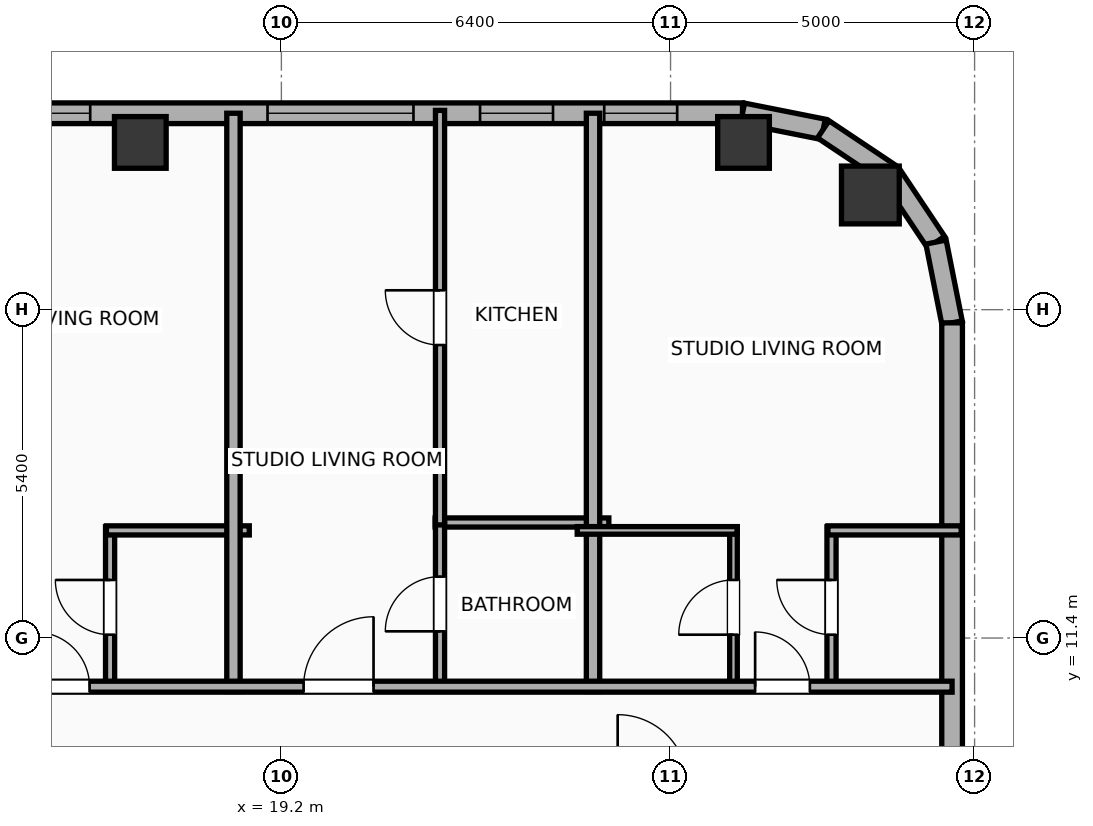
"""IFC4 building model, lengths in metres.
Left out: names, types, materials, properties, quantities, classifications, styles, units other than length and angle.
Written with IfcOpenShell. Run it as: python <this file> out.ifc"""

import sys

from ifc_helpers import new_model, si_unit, direction, frame, frame_2d, origin, origin_2d, place, context, subcontext, project, spatial, rectangle, hollow_rectangle, hollow_circle, extrude, element, fill, save


model = new_model("IFC4")
c1 = context("Model", 3, precision=1e-05, world=origin(), true_north=direction((0.0, 1.0)))
c2 = subcontext(c1, "Body", "Model", "MODEL_VIEW")
j1 = project(units=[si_unit("LENGTHUNIT", "METRE"), si_unit("PLANEANGLEUNIT", "RADIAN")], contexts=[c1])
p1 = place(None, origin())
s1 = spatial("IfcSite", under=j1, at=p1, CompositionType="ELEMENT")
p2 = place(p1, origin())
s2 = spatial("IfcBuilding", under=s1, at=p2, CompositionType="ELEMENT")
p3 = place(p2, frame((0.0, 0.0, 247.0)))
s3 = spatial("IfcBuildingStorey", under=s2, at=p3, CompositionType="ELEMENT", Elevation=247.0)
p4 = place(p3, frame((28.886, 18.686, 0.0), z_axis=(0.0, 0.0, 1.0), x_axis=(1.0, 0.0, 0.0)))
e1 = element("IfcColumn", 1, at=p4, inside=s3, PredefinedType="COLUMN", context=c2, shape_type="SweptSolid", body=[
    extrude(hollow_circle(Radius=0.475, WallThickness=0.032, at=origin_2d()), origin(), (0.0, 0.0, 1.0), 3.9),
])
for number, where, z_axis, x_axis in (
    (2, (26.8, 19.55, 0.0), (0.0, 0.0, 1.0), (1.0, 0.0, 0.0)),
    (3, (16.88, 19.55, 0.0), (0.0, 0.0, 1.0), (1.0, 0.0, 0.0)),
):
    element("IfcColumn", number, at=place(p3, frame(where, z_axis=z_axis, x_axis=x_axis)), inside=s3, PredefinedType="COLUMN", context=c2, shape_type="SweptSolid", body=[
        extrude(hollow_rectangle(XDim=0.85, YDim=0.85, WallThickness=0.028, at=origin_2d()), origin(), (0.0, 0.0, 1.0), 3.9),
    ])
p5 = place(p3, frame((-22.783, 20.03, 0.0), z_axis=(0.0, 0.0, 1.0), x_axis=(1.0, 0.0, 0.0)))
e4 = element("IfcWall", 4, at=p5, inside=s3, PredefinedType="ELEMENTEDWALL", context=c2, shape_type="SweptSolid", body=[
    extrude(rectangle(XDim=49.566, YDim=0.34, at=frame_2d((24.783, 0.0))), origin(), (0.0, 0.0, 1.0), 3.65),
])
p6 = place(p5, frame((6.211, 0.0, 0.75)))
e5 = element("IfcOpeningElement", 5, at=p6, cuts=e4, PredefinedType="OPENING", context=c2, shape_type="SweptSolid", body=[
    extrude(rectangle(XDim=2.4, YDim=2.1, at=frame_2d((1.2, 1.05))), frame((0.0, 0.18, 0.0), z_axis=(0.0, -1.0, 0.0), x_axis=(1.0, 0.0, 0.0)), (0.0, 0.0, 1.0), 0.36),
])
p7 = place(p5, frame((23.583, 0.0, 0.75)))
e6 = element("IfcOpeningElement", 6, at=p7, cuts=e4, PredefinedType="OPENING", context=c2, shape_type="SweptSolid", body=[
    extrude(rectangle(XDim=2.4, YDim=2.1, at=frame_2d((1.2, 1.05))), frame((0.0, 0.18, 0.0), z_axis=(0.0, -1.0, 0.0), x_axis=(1.0, 0.0, 0.0)), (0.0, 0.0, 1.0), 0.36),
])
p8 = place(p5, frame((41.756, 0.0, 0.75)))
e7 = element("IfcOpeningElement", 7, at=p8, cuts=e4, PredefinedType="OPENING", context=c2, shape_type="SweptSolid", body=[
    extrude(rectangle(XDim=2.4, YDim=2.1, at=frame_2d((1.2, 1.05))), frame((0.0, 0.18, 0.0), z_axis=(0.0, -1.0, 0.0), x_axis=(1.0, 0.0, 0.0)), (0.0, 0.0, 1.0), 0.36),
])
p9 = place(p5, frame((3.511, 0.0, 0.75)))
e8 = element("IfcOpeningElement", 8, at=p9, cuts=e4, PredefinedType="OPENING", context=c2, shape_type="SweptSolid", body=[
    extrude(rectangle(XDim=1.2, YDim=2.05, at=frame_2d((0.6, 1.025))), frame((0.0, 0.18, 0.0), z_axis=(0.0, -1.0, 0.0), x_axis=(1.0, 0.0, 0.0)), (0.0, 0.0, 1.0), 0.36),
])
p10 = place(p5, frame((11.933, 0.0, 0.75)))
e9 = element("IfcOpeningElement", 9, at=p10, cuts=e4, PredefinedType="OPENING", context=c2, shape_type="SweptSolid", body=[
    extrude(rectangle(XDim=1.2, YDim=2.05, at=frame_2d((0.6, 1.025))), frame((0.0, 0.18, 0.0), z_axis=(0.0, -1.0, 0.0), x_axis=(1.0, 0.0, 0.0)), (0.0, 0.0, 1.0), 0.36),
])
p11 = place(p5, frame((17.953, 0.0, 0.75)))
e10 = element("IfcOpeningElement", 10, at=p11, cuts=e4, PredefinedType="OPENING", context=c2, shape_type="SweptSolid", body=[
    extrude(rectangle(XDim=1.2, YDim=2.05, at=frame_2d((0.6, 1.025))), frame((0.0, 0.18, 0.0), z_axis=(0.0, -1.0, 0.0), x_axis=(1.0, 0.0, 0.0)), (0.0, 0.0, 1.0), 0.36),
])
p12 = place(p5, frame((27.018, 0.0, 0.75)))
e11 = element("IfcOpeningElement", 11, at=p12, cuts=e4, PredefinedType="OPENING", context=c2, shape_type="SweptSolid", body=[
    extrude(rectangle(XDim=1.2, YDim=2.05, at=frame_2d((0.6, 1.025))), frame((0.0, 0.18, 0.0), z_axis=(0.0, -1.0, 0.0), x_axis=(1.0, 0.0, 0.0)), (0.0, 0.0, 1.0), 0.36),
])
p13 = place(p5, frame((30.368, 0.0, 0.75)))
e12 = element("IfcOpeningElement", 12, at=p13, cuts=e4, PredefinedType="OPENING", context=c2, shape_type="SweptSolid", body=[
    extrude(rectangle(XDim=1.2, YDim=2.05, at=frame_2d((0.6, 1.025))), frame((0.0, 0.18, 0.0), z_axis=(0.0, -1.0, 0.0), x_axis=(1.0, 0.0, 0.0)), (0.0, 0.0, 1.0), 0.36),
])
p14 = place(p5, frame((33.378, 0.0, 0.75)))
e13 = element("IfcOpeningElement", 13, at=p14, cuts=e4, PredefinedType="OPENING", context=c2, shape_type="SweptSolid", body=[
    extrude(rectangle(XDim=1.2, YDim=2.05, at=frame_2d((0.6, 1.025))), frame((0.0, 0.18, 0.0), z_axis=(0.0, -1.0, 0.0), x_axis=(1.0, 0.0, 0.0)), (0.0, 0.0, 1.0), 0.36),
])
p15 = place(p5, frame((37.639, 0.0, 0.75)))
e14 = element("IfcOpeningElement", 14, at=p15, cuts=e4, PredefinedType="OPENING", context=c2, shape_type="SweptSolid", body=[
    extrude(rectangle(XDim=1.2, YDim=2.05, at=frame_2d((0.6, 1.025))), frame((0.0, 0.18, 0.0), z_axis=(0.0, -1.0, 0.0), x_axis=(1.0, 0.0, 0.0)), (0.0, 0.0, 1.0), 0.36),
])
p16 = place(p5, frame((45.25, 0.0, 0.75)))
e15 = element("IfcOpeningElement", 15, at=p16, cuts=e4, PredefinedType="OPENING", context=c2, shape_type="SweptSolid", body=[
    extrude(rectangle(XDim=1.2, YDim=2.05, at=frame_2d((0.6, 1.025))), frame((0.0, 0.18, 0.0), z_axis=(0.0, -1.0, 0.0), x_axis=(1.0, 0.0, 0.0)), (0.0, 0.0, 1.0), 0.36),
])
p17 = place(p5, frame((47.292, 0.0, 0.75)))
e16 = element("IfcOpeningElement", 16, at=p17, cuts=e4, PredefinedType="OPENING", context=c2, shape_type="SweptSolid", body=[
    extrude(rectangle(XDim=1.2, YDim=2.05, at=frame_2d((0.6, 1.025))), frame((0.0, 0.18, 0.0), z_axis=(0.0, -1.0, 0.0), x_axis=(1.0, 0.0, 0.0)), (0.0, 0.0, 1.0), 0.36),
])
p18 = place(p3, frame((26.783, 20.03, 0.0), z_axis=(0.0, 0.0, 1.0), x_axis=(0.980788153188, -0.195075878998, 0.0)))
e17 = element("IfcWall", 17, at=p18, inside=s3, PredefinedType="ELEMENTEDWALL", context=c2, shape_type="SweptSolid", body=[
    extrude(rectangle(XDim=1.354, YDim=0.34, at=frame_2d((0.677, 0.0))), origin(), (0.0, 0.0, 1.0), 3.65),
])
for number, where, z_axis, x_axis in (
    (18, (28.111, 19.766, 0.0), (0.0, 0.0, 1.0), (0.831, -0.556, 0.0)),
    (19, (29.223, 19.023, 0.0), (0.0, 0.0, 1.0), (0.556, -0.831, 0.0)),
):
    element("IfcWall", number, at=place(p3, frame(where, z_axis=z_axis, x_axis=x_axis)), inside=s3, PredefinedType="ELEMENTEDWALL", context=c2, shape_type="SweptSolid", body=[
        extrude(rectangle(XDim=1.337, YDim=0.34, at=frame_2d((0.668, 0.0))), origin(), (0.0, 0.0, 1.0), 3.65),
    ])
p19 = place(p3, frame((29.966, 17.911, 0.0), z_axis=(0.0, 0.0, 1.0), x_axis=(0.195075878998, -0.980788153188, 0.0)))
e20 = element("IfcWall", 20, at=p19, inside=s3, PredefinedType="ELEMENTEDWALL", context=c2, shape_type="SweptSolid", body=[
    extrude(rectangle(XDim=1.354, YDim=0.34, at=frame_2d((0.677, 0.0))), origin(), (0.0, 0.0, 1.0), 3.65),
])
p20 = place(p3, frame((30.23, 16.583, 0.0), z_axis=(0.0, 0.0, 1.0), x_axis=(0.0, -1.0, 0.0)))
e21 = element("IfcWall", 21, at=p20, inside=s3, PredefinedType="ELEMENTEDWALL", context=c2, shape_type="SweptSolid", body=[
    extrude(rectangle(XDim=31.967, YDim=0.34, at=frame_2d((15.983, 0.0))), origin(), (0.0, 0.0, 1.0), 3.65),
])
p21 = place(p20, frame((11.388, 0.0, 0.75)))
e22 = element("IfcOpeningElement", 22, at=p21, cuts=e21, PredefinedType="OPENING", context=c2, shape_type="SweptSolid", body=[
    extrude(rectangle(XDim=1.2, YDim=2.05, at=frame_2d((0.6, 1.025))), frame((0.0, 0.18, 0.0), z_axis=(0.0, -1.0, 0.0), x_axis=(1.0, 0.0, 0.0)), (0.0, 0.0, 1.0), 0.36),
])
p22 = place(p20, frame((20.438, 0.0, 0.75)))
e23 = element("IfcOpeningElement", 23, at=p22, cuts=e21, PredefinedType="OPENING", context=c2, shape_type="SweptSolid", body=[
    extrude(rectangle(XDim=1.2, YDim=2.05, at=frame_2d((0.6, 1.025))), frame((0.0, 0.18, 0.0), z_axis=(0.0, -1.0, 0.0), x_axis=(1.0, 0.0, 0.0)), (0.0, 0.0, 1.0), 0.36),
])
p23 = place(p3, frame((16.383, 10.58, 0.0), z_axis=(0.0, 0.0, 1.0), x_axis=(0.0, 1.0, 0.0)))
e24 = element("IfcWall", 24, at=p23, inside=s3, PredefinedType="PLUMBINGWALL", context=c2, shape_type="SweptSolid", body=[
    extrude(rectangle(XDim=2.65, YDim=0.15, at=frame_2d((1.325, 0.0))), origin(), (0.0, 0.0, 1.0), 3.09),
])
p24 = place(p23, frame((0.875, 0.0, 0.0)))
e25 = element("IfcOpeningElement", 25, at=p24, cuts=e24, PredefinedType="OPENING", context=c2, shape_type="SweptSolid", body=[
    extrude(rectangle(XDim=0.9, YDim=2.05, at=frame_2d((0.45, 1.025))), frame((0.0, 0.085, 0.0), z_axis=(0.0, -1.0, 0.0), x_axis=(1.0, 0.0, 0.0)), (0.0, 0.0, 1.0), 0.17),
])
p25 = place(p3, frame((16.323, 13.17, 0.0), z_axis=(0.0, 0.0, 1.0), x_axis=(1.0, 0.0, 0.0)))
e26 = element("IfcWall", 26, at=p25, inside=s3, PredefinedType="PLUMBINGWALL", context=c2, shape_type="SweptSolid", body=[
    extrude(rectangle(XDim=2.349, YDim=0.15, at=frame_2d((1.175, 0.0))), origin(), (0.0, 0.0, 1.0), 3.65),
])
p26 = place(p3, frame((18.412, 10.52, 0.0), z_axis=(0.0, 0.0, 1.0), x_axis=(0.0, 1.0, 0.0)))
e27 = element("IfcWall", 27, at=p26, inside=s3, PredefinedType="PARTITIONING", context=c2, shape_type="SweptSolid", body=[
    extrude(rectangle(XDim=9.51, YDim=0.22, at=frame_2d((4.755, 0.0))), origin(), (0.0, 0.0, 1.0), 3.65),
])
p27 = place(p3, frame((21.729, 13.3, 0.0), z_axis=(0.0, 0.0, 1.0), x_axis=(1.0, 0.0, 0.0)))
e28 = element("IfcWall", 28, at=p27, inside=s3, PredefinedType="PLUMBINGWALL", context=c2, shape_type="SweptSolid", body=[
    extrude(rectangle(XDim=2.856, YDim=0.15, at=frame_2d((1.428, 0.0))), origin(), (0.0, 0.0, 1.0), 3.65),
])
p28 = place(p3, frame((21.809, 10.58, 0.0), z_axis=(0.0, 0.0, 1.0), x_axis=(0.0, 1.0, 0.0)))
e29 = element("IfcWall", 29, at=p28, inside=s3, PredefinedType="PLUMBINGWALL", context=c2, shape_type="SweptSolid", body=[
    extrude(rectangle(XDim=2.76, YDim=0.15, at=frame_2d((1.38, 0.0))), origin(), (0.0, 0.0, 1.0), 3.65),
])
p29 = place(p28, frame((0.93, 0.0, 0.0)))
e30 = element("IfcOpeningElement", 30, at=p29, cuts=e29, PredefinedType="OPENING", context=c2, shape_type="SweptSolid", body=[
    extrude(rectangle(XDim=0.9, YDim=2.05, at=frame_2d((0.45, 1.025))), frame((0.0, 0.085, 0.0), z_axis=(0.0, -1.0, 0.0), x_axis=(1.0, 0.0, 0.0)), (0.0, 0.0, 1.0), 0.17),
])
p30 = place(p3, frame((21.809, 13.26, 0.0), z_axis=(0.0, 0.0, 1.0), x_axis=(0.0, 1.0, 0.0)))
e31 = element("IfcWall", 31, at=p30, inside=s3, PredefinedType="PLUMBINGWALL", context=c2, shape_type="SweptSolid", body=[
    extrude(rectangle(XDim=6.817, YDim=0.15, at=frame_2d((3.408, 0.0))), origin(), (0.0, 0.0, 1.0), 3.65),
])
p31 = place(p30, frame((2.958, 0.0, 0.0)))
e32 = element("IfcOpeningElement", 32, at=p31, cuts=e31, PredefinedType="OPENING", context=c2, shape_type="SweptSolid", body=[
    extrude(rectangle(XDim=0.9, YDim=2.05, at=frame_2d((0.45, 1.025))), frame((0.0, 0.085, 0.0), z_axis=(0.0, -1.0, 0.0), x_axis=(1.0, 0.0, 0.0)), (0.0, 0.0, 1.0), 0.17),
])
p32 = place(p3, frame((24.325, 10.52, 0.0), z_axis=(0.0, 0.0, 1.0), x_axis=(0.0, 1.0, 0.0)))
e33 = element("IfcWall", 33, at=p32, inside=s3, PredefinedType="PARTITIONING", context=c2, shape_type="SweptSolid", body=[
    extrude(rectangle(XDim=9.51, YDim=0.22, at=frame_2d((4.755, 0.0))), origin(), (0.0, 0.0, 1.0), 3.65),
])
p33 = place(p3, frame((26.635, 10.58, 0.0), z_axis=(0.0, 0.0, 1.0), x_axis=(0.0, 1.0, 0.0)))
e34 = element("IfcWall", 34, at=p33, inside=s3, PredefinedType="PARTITIONING", context=c2, shape_type="SweptSolid", body=[
    extrude(rectangle(XDim=2.65, YDim=0.125, at=frame_2d((1.325, 0.0))), origin(), (0.0, 0.0, 1.0), 3.65),
])
p34 = place(p33, frame((0.875, 0.0, 0.0)))
e35 = element("IfcOpeningElement", 35, at=p34, cuts=e34, PredefinedType="OPENING", context=c2, shape_type="SweptSolid", body=[
    extrude(rectangle(XDim=0.9, YDim=2.05, at=frame_2d((0.45, 1.025))), frame((0.0, 0.073, 0.0), z_axis=(0.0, -1.0, 0.0), x_axis=(1.0, 0.0, 0.0)), (0.0, 0.0, 1.0), 0.145),
])
p35 = place(p3, frame((28.247, 10.58, 0.0), z_axis=(0.0, 0.0, 1.0), x_axis=(0.0, 1.0, 0.0)))
e36 = element("IfcWall", 36, at=p35, inside=s3, PredefinedType="PLUMBINGWALL", context=c2, shape_type="SweptSolid", body=[
    extrude(rectangle(XDim=2.65, YDim=0.15, at=frame_2d((1.325, 0.0))), origin(), (0.0, 0.0, 1.0), 3.65),
])
p36 = place(p35, frame((0.875, 0.0, 0.0)))
e37 = element("IfcOpeningElement", 37, at=p36, cuts=e36, PredefinedType="OPENING", context=c2, shape_type="SweptSolid", body=[
    extrude(rectangle(XDim=0.9, YDim=2.05, at=frame_2d((0.45, 1.025))), frame((0.0, 0.085, 0.0), z_axis=(0.0, -1.0, 0.0), x_axis=(1.0, 0.0, 0.0)), (0.0, 0.0, 1.0), 0.17),
])
p37 = place(p3, frame((24.065, 13.17, 0.0), z_axis=(0.0, 0.0, 1.0), x_axis=(1.0, 0.0, 0.0)))
e38 = element("IfcWall", 38, at=p37, inside=s3, PredefinedType="PARTITIONING", context=c2, shape_type="SweptSolid", body=[
    extrude(rectangle(XDim=2.63, YDim=0.125, at=frame_2d((1.315, 0.0))), origin(), (0.0, 0.0, 1.0), 3.65),
])
p38 = place(p3, frame((28.187, 13.17, 0.0), z_axis=(0.0, 0.0, 1.0), x_axis=(1.0, 0.0, 0.0)))
e39 = element("IfcWall", 39, at=p38, inside=s3, PredefinedType="PLUMBINGWALL", context=c2, shape_type="SweptSolid", body=[
    extrude(rectangle(XDim=2.193, YDim=0.15, at=frame_2d((1.096, 0.0))), origin(), (0.0, 0.0, 1.0), 3.65),
])
p39 = place(p3, frame((-26.23, 10.6, 0.0), z_axis=(0.0, 0.0, 1.0), x_axis=(1.0, 0.0, 0.0)))
e40 = element("IfcWall", 40, at=p39, inside=s3, PredefinedType="PARTITIONING", context=c2, shape_type="SweptSolid", body=[
    extrude(rectangle(XDim=56.46, YDim=0.18, at=frame_2d((28.23, 0.0))), origin(), (0.0, 0.0, 1.0), 3.65),
])
p40 = place(p39, frame((2.825, 0.0, 0.0)))
e41 = element("IfcOpeningElement", 41, at=p40, cuts=e40, PredefinedType="OPENING", context=c2, shape_type="SweptSolid", body=[
    extrude(rectangle(XDim=0.9, YDim=2.05, at=frame_2d((0.45, 1.025))), frame((0.0, 0.1, 0.0), z_axis=(0.0, -1.0, 0.0), x_axis=(1.0, 0.0, 0.0)), (0.0, 0.0, 1.0), 0.2),
])
p41 = place(p39, frame((10.135, 0.0, 0.0)))
e42 = element("IfcOpeningElement", 42, at=p41, cuts=e40, PredefinedType="OPENING", context=c2, shape_type="SweptSolid", body=[
    extrude(rectangle(XDim=1.15, YDim=2.05, at=frame_2d((0.575, 1.025))), frame((0.0, 0.1, 0.0), z_axis=(0.0, -1.0, 0.0), x_axis=(1.0, 0.0, 0.0)), (0.0, 0.0, 1.0), 0.2),
])
p42 = place(p39, frame((15.658, 0.0, 0.0)))
e43 = element("IfcOpeningElement", 43, at=p42, cuts=e40, PredefinedType="OPENING", context=c2, shape_type="SweptSolid", body=[
    extrude(rectangle(XDim=0.9, YDim=2.05, at=frame_2d((0.45, 1.025))), frame((0.0, 0.1, 0.0), z_axis=(0.0, -1.0, 0.0), x_axis=(1.0, 0.0, 0.0)), (0.0, 0.0, 1.0), 0.2),
])
p43 = place(p39, frame((22.156, 0.0, 0.0)))
e44 = element("IfcOpeningElement", 44, at=p43, cuts=e40, PredefinedType="OPENING", context=c2, shape_type="SweptSolid", body=[
    extrude(rectangle(XDim=0.9, YDim=2.05, at=frame_2d((0.45, 1.025))), frame((0.0, 0.1, 0.0), z_axis=(0.0, -1.0, 0.0), x_axis=(1.0, 0.0, 0.0)), (0.0, 0.0, 1.0), 0.2),
])
p44 = place(p39, frame((27.271, 0.0, 0.0)))
e45 = element("IfcOpeningElement", 45, at=p44, cuts=e40, PredefinedType="OPENING", context=c2, shape_type="SweptSolid", body=[
    extrude(rectangle(XDim=1.15, YDim=2.05, at=frame_2d((0.575, 1.025))), frame((0.0, 0.1, 0.0), z_axis=(0.0, -1.0, 0.0), x_axis=(1.0, 0.0, 0.0)), (0.0, 0.0, 1.0), 0.2),
])
p45 = place(p39, frame((33.628, 0.0, 0.0)))
e46 = element("IfcOpeningElement", 46, at=p45, cuts=e40, PredefinedType="OPENING", context=c2, shape_type="SweptSolid", body=[
    extrude(rectangle(XDim=1.15, YDim=2.05, at=frame_2d((0.575, 1.025))), frame((0.0, 0.1, 0.0), z_axis=(0.0, -1.0, 0.0), x_axis=(1.0, 0.0, 0.0)), (0.0, 0.0, 1.0), 0.2),
])
p46 = place(p39, frame((41.375, 0.0, 0.0)))
e47 = element("IfcOpeningElement", 47, at=p46, cuts=e40, PredefinedType="OPENING", context=c2, shape_type="SweptSolid", body=[
    extrude(rectangle(XDim=0.9, YDim=2.05, at=frame_2d((0.45, 1.025))), frame((0.0, 0.1, 0.0), z_axis=(0.0, -1.0, 0.0), x_axis=(1.0, 0.0, 0.0)), (0.0, 0.0, 1.0), 0.2),
])
p47 = place(p39, frame((45.796, 0.0, 0.0)))
e48 = element("IfcOpeningElement", 48, at=p47, cuts=e40, PredefinedType="OPENING", context=c2, shape_type="SweptSolid", body=[
    extrude(rectangle(XDim=1.15, YDim=2.05, at=frame_2d((0.575, 1.025))), frame((0.0, 0.1, 0.0), z_axis=(0.0, -1.0, 0.0), x_axis=(1.0, 0.0, 0.0)), (0.0, 0.0, 1.0), 0.2),
])
p48 = place(p39, frame((53.221, 0.0, 0.0)))
e49 = element("IfcOpeningElement", 49, at=p48, cuts=e40, PredefinedType="OPENING", context=c2, shape_type="SweptSolid", body=[
    extrude(rectangle(XDim=0.9, YDim=2.05, at=frame_2d((0.45, 1.025))), frame((0.0, 0.1, 0.0), z_axis=(0.0, -1.0, 0.0), x_axis=(1.0, 0.0, 0.0)), (0.0, 0.0, 1.0), 0.2),
])
p49 = place(p8, origin())
e50 = element("IfcWindow", 50, at=p49, inside=s3, PartitioningType="SINGLE_PANEL", PredefinedType="WINDOW", context=c2, shape_type="SweptSolid", body=[
    extrude(rectangle(XDim=2.4, YDim=2.1, at=frame_2d((1.2, 1.05))), frame((0.0, 0.03, 0.0), z_axis=(0.0, -1.0, 0.0), x_axis=(1.0, 0.0, 0.0)), (0.0, 0.0, 1.0), 0.06),
])
fill(e7, e50)
p50 = place(p15, origin())
e51 = element("IfcWindow", 51, at=p50, inside=s3, PartitioningType="SINGLE_PANEL", PredefinedType="WINDOW", context=c2, shape_type="SweptSolid", body=[
    extrude(rectangle(XDim=1.2, YDim=2.05, at=frame_2d((0.6, 1.025))), frame((0.0, 0.03, 0.0), z_axis=(0.0, -1.0, 0.0), x_axis=(1.0, 0.0, 0.0)), (0.0, 0.0, 1.0), 0.06),
])
fill(e14, e51)
p51 = place(p16, origin())
e52 = element("IfcWindow", 52, at=p51, inside=s3, PartitioningType="SINGLE_PANEL", PredefinedType="WINDOW", context=c2, shape_type="SweptSolid", body=[
    extrude(rectangle(XDim=1.2, YDim=2.05, at=frame_2d((0.6, 1.025))), frame((0.0, 0.03, 0.0), z_axis=(0.0, -1.0, 0.0), x_axis=(1.0, 0.0, 0.0)), (0.0, 0.0, 1.0), 0.06),
])
fill(e15, e52)
p52 = place(p17, origin())
e53 = element("IfcWindow", 53, at=p52, inside=s3, PartitioningType="SINGLE_PANEL", PredefinedType="WINDOW", context=c2, shape_type="SweptSolid", body=[
    extrude(rectangle(XDim=1.2, YDim=2.05, at=frame_2d((0.6, 1.025))), frame((0.0, 0.03, 0.0), z_axis=(0.0, -1.0, 0.0), x_axis=(1.0, 0.0, 0.0)), (0.0, 0.0, 1.0), 0.06),
])
fill(e16, e53)
p53 = place(p24, origin())
e54 = element("IfcDoor", 54, at=p53, inside=s3, OperationType="SINGLE_SWING_RIGHT", PredefinedType="DOOR", context=c2, shape_type="SweptSolid", body=[
    extrude(rectangle(XDim=0.9, YDim=2.05, at=frame_2d((0.45, 1.025))), frame((0.0, 0.025, 0.0), z_axis=(0.0, -1.0, 0.0), x_axis=(1.0, 0.0, 0.0)), (0.0, 0.0, 1.0), 0.05),
])
fill(e25, e54)
p54 = place(p29, origin())
e55 = element("IfcDoor", 55, at=p54, inside=s3, OperationType="SINGLE_SWING_LEFT", PredefinedType="DOOR", context=c2, shape_type="SweptSolid", body=[
    extrude(rectangle(XDim=0.9, YDim=2.05, at=frame_2d((0.45, 1.025))), frame((0.0, 0.025, 0.0), z_axis=(0.0, -1.0, 0.0), x_axis=(1.0, 0.0, 0.0)), (0.0, 0.0, 1.0), 0.05),
])
fill(e30, e55)
p55 = place(p31, origin())
e56 = element("IfcDoor", 56, at=p55, inside=s3, OperationType="SINGLE_SWING_RIGHT", PredefinedType="DOOR", context=c2, shape_type="SweptSolid", body=[
    extrude(rectangle(XDim=0.9, YDim=2.05, at=frame_2d((0.45, 1.025))), frame((0.0, 0.025, 0.0), z_axis=(0.0, -1.0, 0.0), x_axis=(1.0, 0.0, 0.0)), (0.0, 0.0, 1.0), 0.05),
])
fill(e32, e56)
p56 = place(p34, origin())
e57 = element("IfcDoor", 57, at=p56, inside=s3, OperationType="SINGLE_SWING_LEFT", PredefinedType="DOOR", context=c2, shape_type="SweptSolid", body=[
    extrude(rectangle(XDim=0.9, YDim=2.05, at=frame_2d((0.45, 1.025))), frame((0.0, 0.025, 0.0), z_axis=(0.0, -1.0, 0.0), x_axis=(1.0, 0.0, 0.0)), (0.0, 0.0, 1.0), 0.05),
])
fill(e35, e57)
p57 = place(p36, origin())
e58 = element("IfcDoor", 58, at=p57, inside=s3, OperationType="SINGLE_SWING_RIGHT", PredefinedType="DOOR", context=c2, shape_type="SweptSolid", body=[
    extrude(rectangle(XDim=0.9, YDim=2.05, at=frame_2d((0.45, 1.025))), frame((0.0, 0.025, 0.0), z_axis=(0.0, -1.0, 0.0), x_axis=(1.0, 0.0, 0.0)), (0.0, 0.0, 1.0), 0.05),
])
fill(e37, e58)
p58 = place(p46, origin())
e59 = element("IfcDoor", 59, at=p58, inside=s3, OperationType="SINGLE_SWING_LEFT", PredefinedType="DOOR", context=c2, shape_type="SweptSolid", body=[
    extrude(rectangle(XDim=0.9, YDim=2.05, at=frame_2d((0.45, 1.025))), frame((0.0, 0.025, 0.0), z_axis=(0.0, -1.0, 0.0), x_axis=(1.0, 0.0, 0.0)), (0.0, 0.0, 1.0), 0.05),
])
fill(e47, e59)
p59 = place(p47, origin())
e60 = element("IfcDoor", 60, at=p59, inside=s3, OperationType="SINGLE_SWING_RIGHT", PredefinedType="DOOR", context=c2, shape_type="SweptSolid", body=[
    extrude(rectangle(XDim=1.15, YDim=2.05, at=frame_2d((0.575, 1.025))), frame((0.0, 0.025, 0.0), z_axis=(0.0, -1.0, 0.0), x_axis=(1.0, 0.0, 0.0)), (0.0, 0.0, 1.0), 0.05),
])
fill(e48, e60)
p60 = place(p48, origin())
e61 = element("IfcDoor", 61, at=p60, inside=s3, OperationType="SINGLE_SWING_LEFT", PredefinedType="DOOR", context=c2, shape_type="SweptSolid", body=[
    extrude(rectangle(XDim=0.9, YDim=2.05, at=frame_2d((0.45, 1.025))), frame((0.0, 0.025, 0.0), z_axis=(0.0, -1.0, 0.0), x_axis=(1.0, 0.0, 0.0)), (0.0, 0.0, 1.0), 0.05),
])
fill(e49, e61)
save(model, sys.argv[1])
